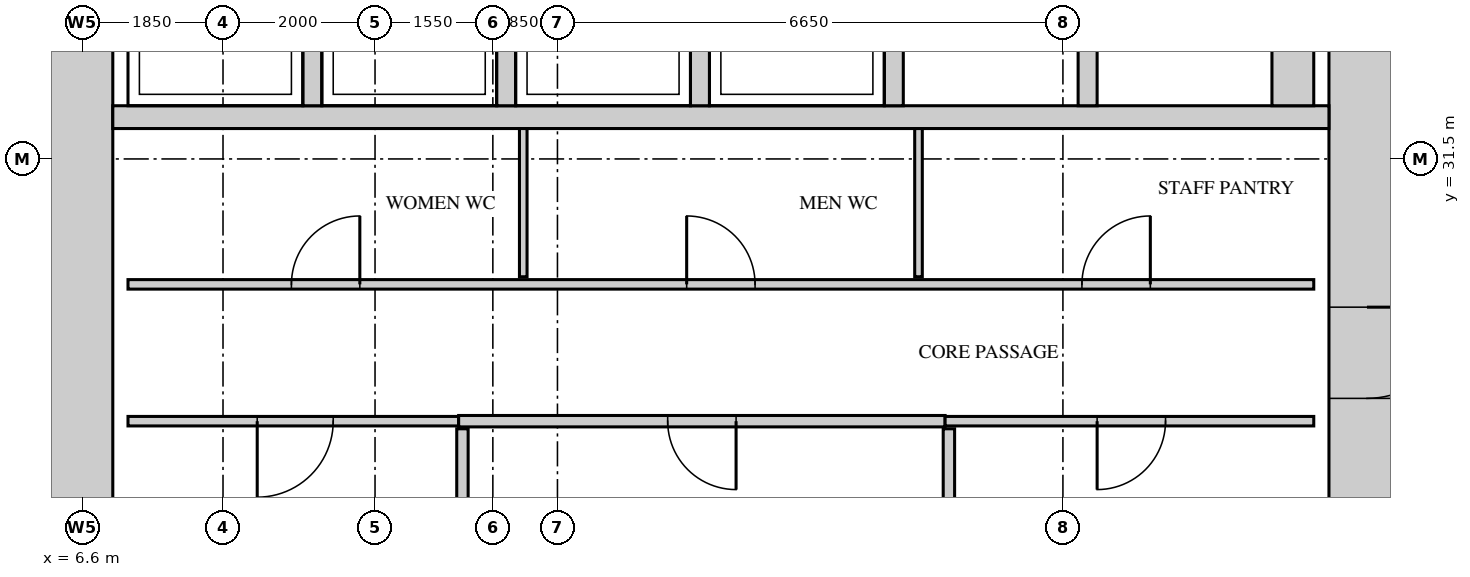
"""IFC4 building model, lengths in metres.
Left out: names, types, materials, properties, quantities, classifications, styles, units other than length and angle.
Written with IfcOpenShell. Run it as: python <this file> out.ifc"""

import sys

from ifc_helpers import new_model, si_unit, direction, frame, frame_2d, origin, place, context, subcontext, project, spatial, rectangle, extrude, source, transform, mapped, element, fill, save


model = new_model("IFC4")
c1 = context("Model", 3, precision=1e-05, world=origin(), true_north=direction((0.0, 1.0)))
c2 = subcontext(c1, "Body", "Model", "MODEL_VIEW")
j1 = project(units=[si_unit("LENGTHUNIT", "METRE"), si_unit("PLANEANGLEUNIT", "RADIAN")], contexts=[c1])
p1 = place(None, origin())
s1 = spatial("IfcSite", under=j1, at=p1, CompositionType="ELEMENT")
p2 = place(p1, origin())
s2 = spatial("IfcBuilding", under=s1, at=p2, CompositionType="ELEMENT")
p3 = place(p2, frame((0.0, 0.0, 127.9)))
s3 = spatial("IfcBuildingStorey", under=s2, at=p3, CompositionType="ELEMENT", Elevation=127.9)
m1 = source(origin(), c2, "Body", "SweptSolid", [
    extrude(rectangle(XDim=28.0, YDim=1.0, at=frame_2d((14.0, 0.0))), origin(), (0.0, 0.0, 1.0), 4.1),
])
p4 = place(p3, frame((23.5, 13.0, 0.0), z_axis=(0.0, 0.0, 1.0), x_axis=(0.0, 1.0, 0.0)))
e1 = element("IfcWall", 1, at=p4, inside=s3, PredefinedType="SHEAR", context=c2, shape_type="MappedRepresentation", body=[
    mapped(m1, transform((0.0, 0.0, 0.0))),
])
m2 = source(origin(), c2, "Body", "SweptSolid", [
    extrude(rectangle(XDim=1.8, YDim=2.1, at=frame_2d((0.9, 1.05))), frame((0.0, 0.51, 0.0), z_axis=(0.0, -1.0, 0.0), x_axis=(1.0, 0.0, 0.0)), (0.0, 0.0, 1.0), 1.02),
])
p5 = place(p4, frame((22.6, 0.0, 0.0)))
e2 = element("IfcOpeningElement", 2, at=p5, cuts=e1, PredefinedType="OPENING", context=c2, shape_type="MappedRepresentation", body=[
    mapped(m2, transform((0.0, 0.0, 0.0))),
])
m3 = source(origin(), c2, "Body", "SweptSolid", [
    extrude(rectangle(XDim=1.2, YDim=2.1, at=frame_2d((0.6, 1.05))), frame((0.0, 0.51, 0.0), z_axis=(0.0, -1.0, 0.0), x_axis=(1.0, 0.0, 0.0)), (0.0, 0.0, 1.0), 1.02),
])
p6 = place(p4, frame((15.35, 0.0, 0.0)))
e3 = element("IfcOpeningElement", 3, at=p6, cuts=e1, PredefinedType="OPENING", context=c2, shape_type="MappedRepresentation", body=[
    mapped(m3, transform((0.0, 0.0, 0.0))),
])
m4 = source(origin(), c2, "Body", "SweptSolid", [
    extrude(rectangle(XDim=0.9, YDim=2.1, at=frame_2d((0.45, 1.05))), frame((0.0, 0.51, 0.0), z_axis=(0.0, -1.0, 0.0), x_axis=(1.0, 0.0, 0.0)), (0.0, 0.0, 1.0), 1.02),
])
p7 = place(p4, frame((1.35, 0.0, 0.0)))
e4 = element("IfcOpeningElement", 4, at=p7, cuts=e1, PredefinedType="OPENING", context=c2, shape_type="MappedRepresentation", body=[
    mapped(m4, transform((0.0, 0.0, 0.0))),
])
p8 = place(p4, frame((4.55, 0.0, 0.0)))
e5 = element("IfcOpeningElement", 5, at=p8, cuts=e1, PredefinedType="OPENING", context=c2, shape_type="MappedRepresentation", body=[
    mapped(m4, transform((0.0, 0.0, 0.0))),
])
p9 = place(p4, frame((7.8, 0.0, 0.0)))
e6 = element("IfcOpeningElement", 6, at=p9, cuts=e1, PredefinedType="OPENING", context=c2, shape_type="MappedRepresentation", body=[
    mapped(m4, transform((0.0, 0.0, 0.0))),
])
p10 = place(p3, frame((6.5, 13.0, 0.0), z_axis=(0.0, 0.0, 1.0), x_axis=(0.0, 1.0, 0.0)))
e7 = element("IfcWall", 7, at=p10, inside=s3, PredefinedType="SHEAR", context=c2, shape_type="MappedRepresentation", body=[
    mapped(m1, transform((0.0, 0.0, 0.0))),
])
m5 = source(origin(), c2, "Body", "SweptSolid", [
    extrude(rectangle(XDim=16.0, YDim=0.3, at=frame_2d((8.0, 0.0))), origin(), (0.0, 0.0, 1.0), 4.1),
])
p11 = place(p3, frame((7.0, 32.05, 0.0), z_axis=(0.0, 0.0, 1.0), x_axis=(1.0, 0.0, 0.0)))
e8 = element("IfcWall", 8, at=p11, inside=s3, PredefinedType="STANDARD", context=c2, shape_type="MappedRepresentation", body=[
    mapped(m5, transform((0.0, 0.0, 0.0))),
])
m6 = source(origin(), c2, "Body", "SweptSolid", [
    extrude(rectangle(XDim=2.4, YDim=0.25, at=frame_2d((1.2, 0.0))), origin(), (0.0, 0.0, 1.0), 4.1),
])
for number, where, z_axis, x_axis in (
    (9, (9.625, 32.2, 0.0), (0.0, 0.0, 1.0), (0.0, 1.0, 0.0)),
    (10, (12.175, 32.2, 0.0), (0.0, 0.0, 1.0), (0.0, 1.0, 0.0)),
    (11, (14.725, 32.2, 0.0), (0.0, 0.0, 1.0), (0.0, 1.0, 0.0)),
    (12, (17.275, 32.2, 0.0), (0.0, 0.0, 1.0), (0.0, 1.0, 0.0)),
    (13, (19.825, 32.2, 0.0), (0.0, 0.0, 1.0), (0.0, 1.0, 0.0)),
):
    element("IfcWall", number, at=place(p3, frame(where, z_axis=z_axis, x_axis=x_axis)), inside=s3, PredefinedType="STANDARD", context=c2, shape_type="MappedRepresentation", body=[
        mapped(m6, transform((0.0, 0.0, 0.0))),
    ])
m7 = source(origin(), c2, "Body", "SweptSolid", [
    extrude(rectangle(XDim=2.4, YDim=0.55, at=frame_2d((1.2, 0.0))), origin(), (0.0, 0.0, 1.0), 4.1),
])
p12 = place(p3, frame((22.525, 32.2, 0.0), z_axis=(0.0, 0.0, 1.0), x_axis=(0.0, 1.0, 0.0)))
e14 = element("IfcWall", 14, at=p12, inside=s3, PredefinedType="STANDARD", context=c2, shape_type="MappedRepresentation", body=[
    mapped(m7, transform((0.0, 0.0, 0.0))),
])
m8 = source(origin(), c2, "Body", "SweptSolid", [
    extrude(rectangle(XDim=5.05, YDim=0.15, at=frame_2d((2.525, 0.0))), origin(), (0.0, 0.0, 1.0), 4.2),
])
p13 = place(p3, frame((11.6, 22.9, 0.0), z_axis=(0.0, 0.0, 1.0), x_axis=(0.0, 1.0, 0.0)))
e15 = element("IfcWall", 15, at=p13, inside=s3, PredefinedType="PARTITIONING", context=c2, shape_type="MappedRepresentation", body=[
    mapped(m8, transform((0.0, 0.0, 0.0))),
])
m9 = source(origin(), c2, "Body", "SweptSolid", [
    extrude(rectangle(XDim=5.0, YDim=0.15, at=frame_2d((2.5, 0.0))), origin(), (0.0, 0.0, 1.0), 4.2),
])
p14 = place(p3, frame((18.0, 22.95, 0.0), z_axis=(0.0, 0.0, 1.0), x_axis=(0.0, 1.0, 0.0)))
e16 = element("IfcWall", 16, at=p14, inside=s3, PredefinedType="PARTITIONING", context=c2, shape_type="MappedRepresentation", body=[
    mapped(m9, transform((0.0, 0.0, 0.0))),
])
m10 = source(origin(), c2, "Body", "SweptSolid", [
    extrude(rectangle(XDim=4.35, YDim=0.125, at=frame_2d((2.175, 0.0))), origin(), (0.0, 0.0, 1.0), 4.2),
])
p15 = place(p3, frame((7.2, 28.05, 0.0), z_axis=(0.0, 0.0, 1.0), x_axis=(1.0, 0.0, 0.0)))
e17 = element("IfcWall", 17, at=p15, inside=s3, PredefinedType="PARTITIONING", context=c2, shape_type="MappedRepresentation", body=[
    mapped(m10, transform((0.0, 0.0, 0.0))),
])
m11 = source(origin(), c2, "Body", "SweptSolid", [
    extrude(rectangle(XDim=1.0, YDim=2.1, at=frame_2d((0.5, 1.05))), frame((0.0, 0.073, 0.0), z_axis=(0.0, -1.0, 0.0), x_axis=(1.0, 0.0, 0.0)), (0.0, 0.0, 1.0), 0.145),
])
p16 = place(p15, frame((1.7, 0.0, 0.0)))
e18 = element("IfcOpeningElement", 18, at=p16, cuts=e17, PredefinedType="OPENING", context=c2, shape_type="MappedRepresentation", body=[
    mapped(m11, transform((0.0, 0.0, 0.0))),
])
m12 = source(origin(), c2, "Body", "SweptSolid", [
    extrude(rectangle(XDim=6.4, YDim=0.15, at=frame_2d((3.2, 0.0))), origin(), (0.0, 0.0, 1.0), 4.2),
])
p17 = place(p3, frame((11.55, 28.05, 0.0), z_axis=(0.0, 0.0, 1.0), x_axis=(1.0, 0.0, 0.0)))
e19 = element("IfcWall", 19, at=p17, inside=s3, PredefinedType="PARTITIONING", context=c2, shape_type="MappedRepresentation", body=[
    mapped(m12, transform((0.0, 0.0, 0.0))),
])
m13 = source(origin(), c2, "Body", "SweptSolid", [
    extrude(rectangle(XDim=0.9, YDim=2.1, at=frame_2d((0.45, 1.05))), frame((0.0, 0.085, 0.0), z_axis=(0.0, -1.0, 0.0), x_axis=(1.0, 0.0, 0.0)), (0.0, 0.0, 1.0), 0.17),
])
p18 = place(p17, frame((2.75, 0.0, 0.0)))
e20 = element("IfcOpeningElement", 20, at=p18, cuts=e19, PredefinedType="OPENING", context=c2, shape_type="MappedRepresentation", body=[
    mapped(m13, transform((0.0, 0.0, 0.0))),
])
m14 = source(origin(), c2, "Body", "SweptSolid", [
    extrude(rectangle(XDim=4.85, YDim=0.125, at=frame_2d((2.425, 0.0))), origin(), (0.0, 0.0, 1.0), 4.2),
])
p19 = place(p3, frame((17.95, 28.05, 0.0), z_axis=(0.0, 0.0, 1.0), x_axis=(1.0, 0.0, 0.0)))
e21 = element("IfcWall", 21, at=p19, inside=s3, PredefinedType="PARTITIONING", context=c2, shape_type="MappedRepresentation", body=[
    mapped(m14, transform((0.0, 0.0, 0.0))),
])
m15 = source(origin(), c2, "Body", "SweptSolid", [
    extrude(rectangle(XDim=0.9, YDim=2.1, at=frame_2d((0.45, 1.05))), frame((0.0, 0.073, 0.0), z_axis=(0.0, -1.0, 0.0), x_axis=(1.0, 0.0, 0.0)), (0.0, 0.0, 1.0), 0.145),
])
p20 = place(p19, frame((2.0, 0.0, 0.0)))
e22 = element("IfcOpeningElement", 22, at=p20, cuts=e21, PredefinedType="OPENING", context=c2, shape_type="MappedRepresentation", body=[
    mapped(m15, transform((0.0, 0.0, 0.0))),
])
m16 = source(origin(), c2, "Body", "SweptSolid", [
    extrude(rectangle(XDim=15.6, YDim=0.125, at=frame_2d((7.8, 0.0))), origin(), (0.0, 0.0, 1.0), 4.2),
])
p21 = place(p3, frame((7.2, 29.85, 0.0), z_axis=(0.0, 0.0, 1.0), x_axis=(1.0, 0.0, 0.0)))
e23 = element("IfcWall", 23, at=p21, inside=s3, PredefinedType="PARTITIONING", context=c2, shape_type="MappedRepresentation", body=[
    mapped(m16, transform((0.0, 0.0, 0.0))),
])
p22 = place(p21, frame((2.15, 0.0, 0.0)))
e24 = element("IfcOpeningElement", 24, at=p22, cuts=e23, PredefinedType="OPENING", context=c2, shape_type="MappedRepresentation", body=[
    mapped(m15, transform((0.0, 0.0, 0.0))),
])
p23 = place(p21, frame((7.35, 0.0, 0.0)))
e25 = element("IfcOpeningElement", 25, at=p23, cuts=e23, PredefinedType="OPENING", context=c2, shape_type="MappedRepresentation", body=[
    mapped(m15, transform((0.0, 0.0, 0.0))),
])
p24 = place(p21, frame((12.55, 0.0, 0.0)))
e26 = element("IfcOpeningElement", 26, at=p24, cuts=e23, PredefinedType="OPENING", context=c2, shape_type="MappedRepresentation", body=[
    mapped(m15, transform((0.0, 0.0, 0.0))),
])
m17 = source(origin(), c2, "Body", "SweptSolid", [
    extrude(rectangle(XDim=1.95, YDim=0.1, at=frame_2d((0.975, 0.0))), origin(), (0.0, 0.0, 1.0), 4.2),
])
for number, where, z_axis, x_axis in (
    (27, (12.4, 29.95, 0.0), (0.0, 0.0, 1.0), (0.0, 1.0, 0.0)),
    (28, (17.6, 29.95, 0.0), (0.0, 0.0, 1.0), (0.0, 1.0, 0.0)),
):
    element("IfcWall", number, at=place(p3, frame(where, z_axis=z_axis, x_axis=x_axis)), inside=s3, PredefinedType="PARTITIONING", context=c2, shape_type="MappedRepresentation", body=[
        mapped(m17, transform((0.0, 0.0, 0.0))),
    ])
m18 = source(origin(), c2, "Body", "SweptSolid", [
    extrude(rectangle(XDim=1.2, YDim=2.1, at=frame_2d((0.6, 1.05))), frame((0.0, 0.45, 0.0), z_axis=(0.0, -1.0, 0.0), x_axis=(1.0, 0.0, 0.0)), (0.0, 0.0, 1.0), 0.9),
])
p25 = place(p6, origin())
e29 = element("IfcDoor", 29, at=p25, inside=s3, OperationType="SINGLE_SWING_RIGHT", PredefinedType="DOOR", context=c2, shape_type="MappedRepresentation", body=[
    mapped(m18, transform((0.0, 0.0, 0.0))),
])
fill(e3, e29)
m19 = source(origin(), c2, "Body", "SweptSolid", [
    extrude(rectangle(XDim=0.9, YDim=2.1, at=frame_2d((0.45, 1.05))), frame((0.0, 0.025, 0.0), z_axis=(0.0, -1.0, 0.0), x_axis=(1.0, 0.0, 0.0)), (0.0, 0.0, 1.0), 0.05),
])
p26 = place(p22, origin())
e30 = element("IfcDoor", 30, at=p26, inside=s3, OperationType="SINGLE_SWING_LEFT", PredefinedType="DOOR", context=c2, shape_type="MappedRepresentation", body=[
    mapped(m19, transform((0.0, 0.0, 0.0))),
])
fill(e24, e30)
p27 = place(p23, origin())
e31 = element("IfcDoor", 31, at=p27, inside=s3, OperationType="SINGLE_SWING_RIGHT", PredefinedType="DOOR", context=c2, shape_type="MappedRepresentation", body=[
    mapped(m19, transform((0.0, 0.0, 0.0))),
])
fill(e25, e31)
p28 = place(p24, origin())
e32 = element("IfcDoor", 32, at=p28, inside=s3, OperationType="SINGLE_SWING_LEFT", PredefinedType="DOOR", context=c2, shape_type="MappedRepresentation", body=[
    mapped(m19, transform((0.0, 0.0, 0.0))),
])
fill(e26, e32)
m20 = source(origin(), c2, "Body", "SweptSolid", [
    extrude(rectangle(XDim=1.0, YDim=2.1, at=frame_2d((0.5, 1.05))), frame((0.0, 0.025, 0.0), z_axis=(0.0, -1.0, 0.0), x_axis=(1.0, 0.0, 0.0)), (0.0, 0.0, 1.0), 0.05),
])
p29 = place(p16, origin())
e33 = element("IfcDoor", 33, at=p29, inside=s3, OperationType="SINGLE_SWING_LEFT", PredefinedType="DOOR", context=c2, shape_type="MappedRepresentation", body=[
    mapped(m20, transform((0.0, 0.0, 0.0))),
])
fill(e18, e33)
p30 = place(p18, origin())
e34 = element("IfcDoor", 34, at=p30, inside=s3, OperationType="SINGLE_SWING_RIGHT", PredefinedType="DOOR", context=c2, shape_type="MappedRepresentation", body=[
    mapped(m19, transform((0.0, 0.0, 0.0))),
])
fill(e20, e34)
p31 = place(p20, origin())
e35 = element("IfcDoor", 35, at=p31, inside=s3, OperationType="SINGLE_SWING_LEFT", PredefinedType="DOOR", context=c2, shape_type="MappedRepresentation", body=[
    mapped(m19, transform((0.0, 0.0, 0.0))),
])
fill(e22, e35)
save(model, sys.argv[1])
